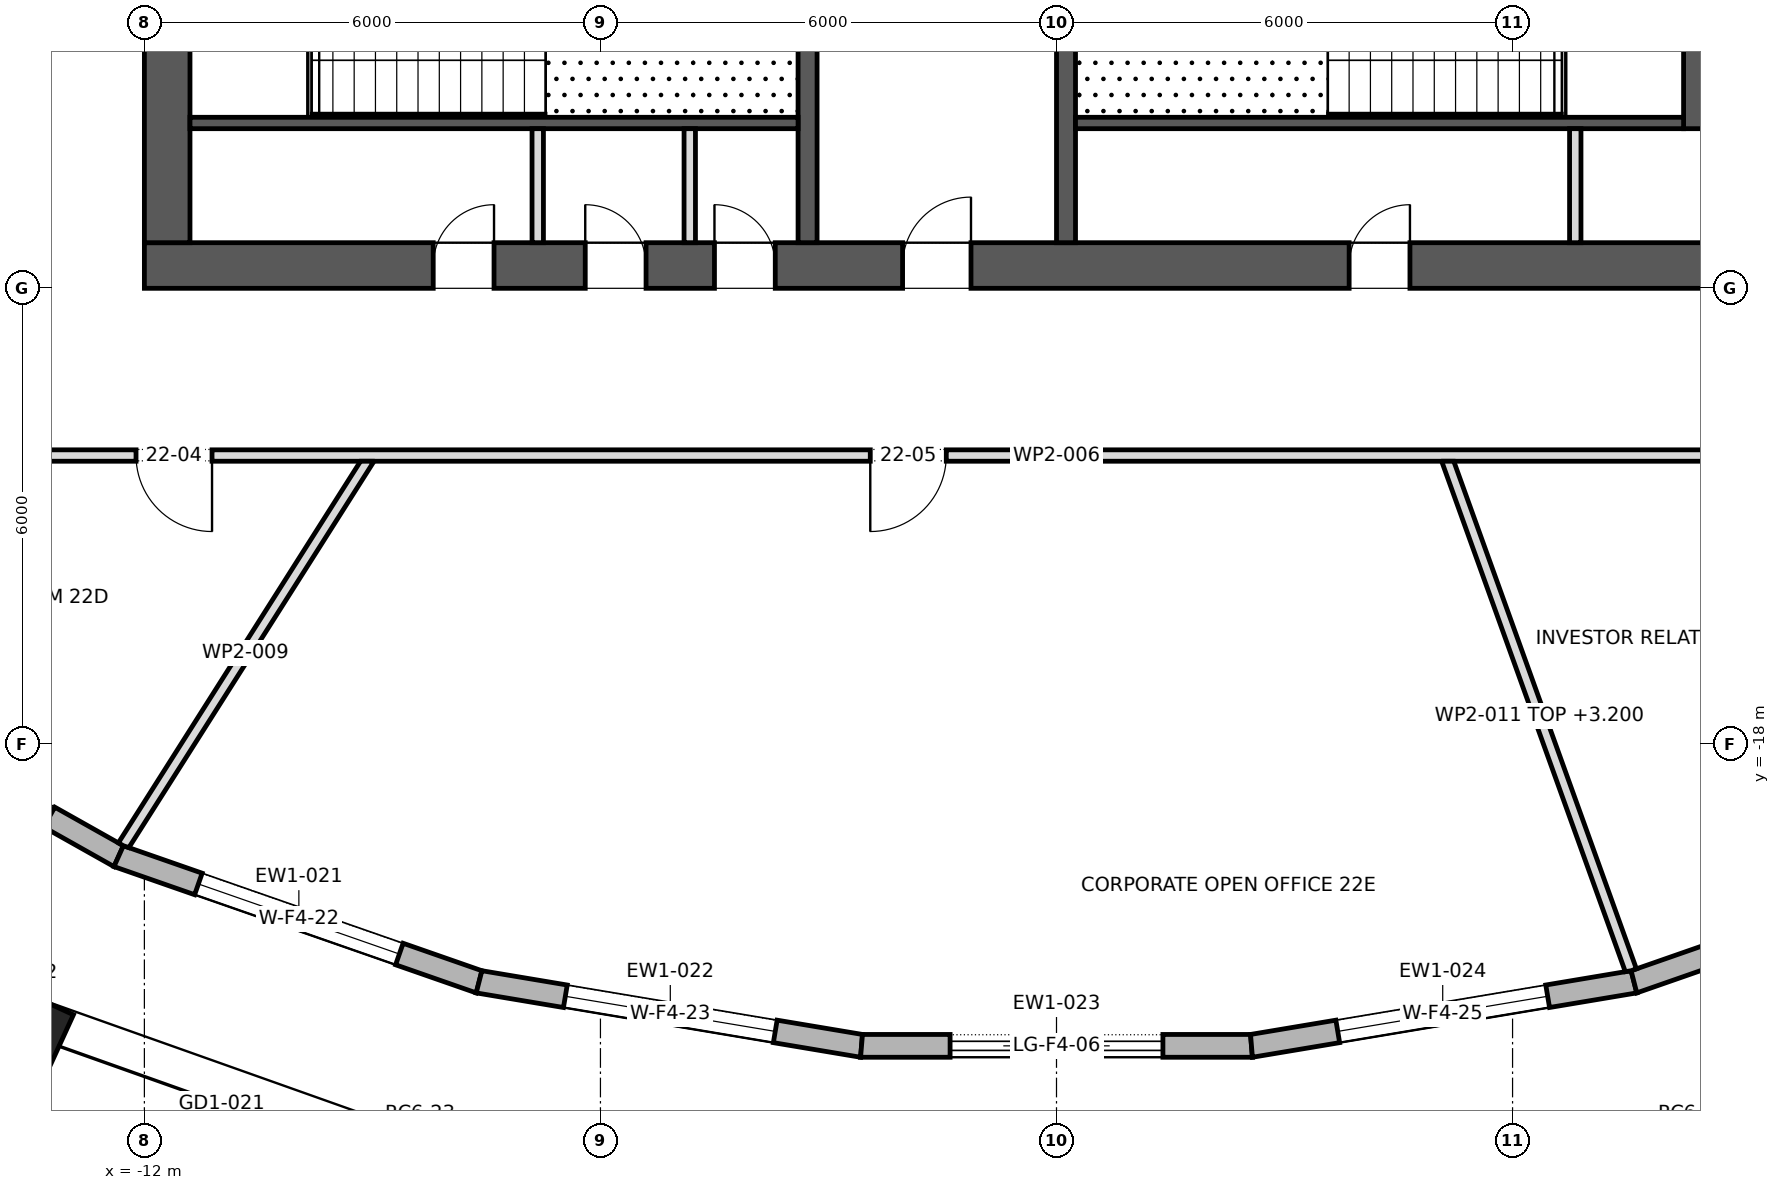
"""IFC4 building model, lengths in metres.
Left out: names, types, materials, properties, quantities, classifications, styles, units other than length and angle.
Written with IfcOpenShell. Run it as: python <this file> out.ifc"""

import sys

from ifc_helpers import new_model, si_unit, direction, frame, frame_2d, origin, origin_2d, place, context, subcontext, project, spatial, polyline, rectangle, outline, extrude, element, fill, save


model = new_model("IFC4")
c1 = context("Model", 3, precision=1e-05, world=origin(), true_north=direction((0.0, 1.0)))
c2 = subcontext(c1, "Body", "Model", "MODEL_VIEW")
j1 = project(units=[si_unit("LENGTHUNIT", "METRE"), si_unit("PLANEANGLEUNIT", "RADIAN")], contexts=[c1])
p1 = place(None, origin())
s1 = spatial("IfcSite", under=j1, at=p1, CompositionType="ELEMENT")
p2 = place(p1, origin())
s2 = spatial("IfcBuilding", under=s1, at=p2, CompositionType="ELEMENT")
p3 = place(p2, frame((0.0, 0.0, 304.3)))
s3 = spatial("IfcBuildingStorey", under=s2, at=p3, CompositionType="ELEMENT", Elevation=304.3)
p4 = place(p3, frame((-13.596, -21.803, 0.0), z_axis=(0.0, 0.0, 1.0), x_axis=(0.909126368869, -0.416520402174, 0.0)))
e1 = element("IfcColumn", 1, at=p4, inside=s3, PredefinedType="COLUMN", context=c2, shape_type="SweptSolid", body=[
    extrude(rectangle(XDim=1.0, YDim=1.0, at=origin_2d()), origin(), (0.0, 0.0, 1.0), 4.0),
])
p5 = place(p3, frame((-12.0, -11.7, 0.0), z_axis=(0.0, 0.0, 1.0), x_axis=(1.0, 0.0, 0.0)))
e2 = element("IfcWall", 2, at=p5, inside=s3, PredefinedType="SHEAR", context=c2, shape_type="SweptSolid", body=[
    extrude(rectangle(XDim=24.0, YDim=0.6, at=frame_2d((12.0, 0.0))), origin(), (0.0, 0.0, 1.0), 4.0),
])
p6 = place(p5, frame((9.975, 0.0, 0.0)))
e3 = element("IfcOpeningElement", 3, at=p6, cuts=e2, PredefinedType="OPENING", context=c2, shape_type="SweptSolid", body=[
    extrude(rectangle(XDim=0.9, YDim=2.1, at=frame_2d((0.45, 1.05))), frame((0.0, 0.312, 0.0), z_axis=(0.0, -1.0, 0.0), x_axis=(1.0, 0.0, 0.0)), (0.0, 0.0, 1.0), 0.624),
])
p7 = place(p5, frame((3.8, 0.0, 0.0)))
e4 = element("IfcOpeningElement", 4, at=p7, cuts=e2, PredefinedType="OPENING", context=c2, shape_type="SweptSolid", body=[
    extrude(rectangle(XDim=0.8, YDim=2.1, at=frame_2d((0.4, 1.05))), frame((0.0, 0.312, 0.0), z_axis=(0.0, -1.0, 0.0), x_axis=(1.0, 0.0, 0.0)), (0.0, 0.0, 1.0), 0.624),
])
p8 = place(p5, frame((5.8, 0.0, 0.0)))
e5 = element("IfcOpeningElement", 5, at=p8, cuts=e2, PredefinedType="OPENING", context=c2, shape_type="SweptSolid", body=[
    extrude(rectangle(XDim=0.8, YDim=2.1, at=frame_2d((0.4, 1.05))), frame((0.0, 0.312, 0.0), z_axis=(0.0, -1.0, 0.0), x_axis=(1.0, 0.0, 0.0)), (0.0, 0.0, 1.0), 0.624),
])
p9 = place(p5, frame((7.5, 0.0, 0.0)))
e6 = element("IfcOpeningElement", 6, at=p9, cuts=e2, PredefinedType="OPENING", context=c2, shape_type="SweptSolid", body=[
    extrude(rectangle(XDim=0.8, YDim=2.1, at=frame_2d((0.4, 1.05))), frame((0.0, 0.312, 0.0), z_axis=(0.0, -1.0, 0.0), x_axis=(1.0, 0.0, 0.0)), (0.0, 0.0, 1.0), 0.624),
])
p10 = place(p5, frame((15.85, 0.0, 0.0)))
e7 = element("IfcOpeningElement", 7, at=p10, cuts=e2, PredefinedType="OPENING", context=c2, shape_type="SweptSolid", body=[
    extrude(rectangle(XDim=0.8, YDim=2.1, at=frame_2d((0.4, 1.05))), frame((0.0, 0.312, 0.0), z_axis=(0.0, -1.0, 0.0), x_axis=(1.0, 0.0, 0.0)), (0.0, 0.0, 1.0), 0.624),
])
p11 = place(p3, frame((-11.7, -11.4, 0.0), z_axis=(0.0, 0.0, 1.0), x_axis=(0.0, 1.0, 0.0)))
e8 = element("IfcWall", 8, at=p11, inside=s3, PredefinedType="SHEAR", context=c2, shape_type="SweptSolid", body=[
    extrude(rectangle(XDim=22.8, YDim=0.6, at=frame_2d((11.4, 0.0))), origin(), (0.0, 0.0, 1.0), 4.0),
])
p12 = place(p11, frame((10.2, 0.0, 0.0)))
e9 = element("IfcOpeningElement", 9, at=p12, cuts=e8, PredefinedType="OPENING", context=c2, shape_type="SweptSolid", body=[
    extrude(rectangle(XDim=2.4, YDim=2.1, at=frame_2d((1.2, 1.05))), frame((0.0, 0.312, 0.0), z_axis=(0.0, -1.0, 0.0), x_axis=(1.0, 0.0, 0.0)), (0.0, 0.0, 1.0), 0.624),
])
p13 = place(p11, frame((18.925, 0.0, 0.0)))
e10 = element("IfcOpeningElement", 10, at=p13, cuts=e8, PredefinedType="OPENING", context=c2, shape_type="SweptSolid", body=[
    extrude(rectangle(XDim=1.2, YDim=2.1, at=frame_2d((0.6, 1.05))), frame((0.0, 0.312, 0.0), z_axis=(0.0, -1.0, 0.0), x_axis=(1.0, 0.0, 0.0)), (0.0, 0.0, 1.0), 0.624),
])
p14 = place(p11, frame((2.675, 0.0, 0.0)))
e11 = element("IfcOpeningElement", 11, at=p14, cuts=e8, PredefinedType="OPENING", context=c2, shape_type="SweptSolid", body=[
    extrude(rectangle(XDim=1.2, YDim=2.1, at=frame_2d((0.6, 1.05))), frame((0.0, 0.312, 0.0), z_axis=(0.0, -1.0, 0.0), x_axis=(1.0, 0.0, 0.0)), (0.0, 0.0, 1.0), 0.624),
])
p15 = place(p3, frame((-16.607, -17.07, 0.0), z_axis=(0.0, 0.0, 1.0), x_axis=(0.871570211895, -0.490270706588, 0.0)))
e12 = element("IfcWall", 12, at=p15, inside=s3, PredefinedType="STANDARD", context=c2, shape_type="SweptSolid", body=[
    extrude(outline(polyline([(-0.014, -0.15), (4.911, -0.15), (4.884, 0.15), (0.014, 0.15), (-0.014, -0.15)])), origin(), (0.0, 0.0, 1.0), 3.7),
])
p16 = place(p15, frame((1.049, 0.0, 0.6)))
e13 = element("IfcOpeningElement", 13, at=p16, cuts=e12, PredefinedType="OPENING", context=c2, shape_type="SweptSolid", body=[
    extrude(rectangle(XDim=2.8, YDim=2.65, at=frame_2d((1.4, 1.325))), frame((0.0, 0.162, 0.0), z_axis=(0.0, -1.0, 0.0), x_axis=(1.0, 0.0, 0.0)), (0.0, 0.0, 1.0), 0.324),
])
p17 = place(p3, frame((-12.338, -19.471, 0.0), z_axis=(0.0, 0.0, 1.0), x_axis=(0.944251863618, -0.329223963365, 0.0)))
e14 = element("IfcWall", 14, at=p17, inside=s3, PredefinedType="STANDARD", context=c2, shape_type="SweptSolid", body=[
    extrude(outline(polyline([(-0.013, -0.15), (5.034, -0.15), (5.009, 0.15), (0.013, 0.15), (-0.013, -0.15)])), origin(), (0.0, 0.0, 1.0), 3.7),
])
p18 = place(p17, frame((1.111, 0.0, 0.6)))
e15 = element("IfcOpeningElement", 15, at=p18, cuts=e14, PredefinedType="OPENING", context=c2, shape_type="SweptSolid", body=[
    extrude(rectangle(XDim=2.8, YDim=2.65, at=frame_2d((1.4, 1.325))), frame((0.0, 0.162, 0.0), z_axis=(0.0, -1.0, 0.0), x_axis=(1.0, 0.0, 0.0)), (0.0, 0.0, 1.0), 0.324),
])
p19 = place(p3, frame((-7.597, -21.124, 0.0), z_axis=(0.0, 0.0, 1.0), x_axis=(0.986269480969, -0.165143909695, 0.0)))
e16 = element("IfcWall", 16, at=p19, inside=s3, PredefinedType="STANDARD", context=c2, shape_type="SweptSolid", body=[
    extrude(outline(polyline([(-0.013, -0.15), (5.114, -0.15), (5.089, 0.15), (0.013, 0.15), (-0.013, -0.15)])), origin(), (0.0, 0.0, 1.0), 3.7),
])
p20 = place(p19, frame((1.151, 0.0, 0.6)))
e17 = element("IfcOpeningElement", 17, at=p20, cuts=e16, PredefinedType="OPENING", context=c2, shape_type="SweptSolid", body=[
    extrude(rectangle(XDim=2.8, YDim=2.65, at=frame_2d((1.4, 1.325))), frame((0.0, 0.162, 0.0), z_axis=(0.0, -1.0, 0.0), x_axis=(1.0, 0.0, 0.0)), (0.0, 0.0, 1.0), 0.324),
])
p21 = place(p3, frame((-2.565, -21.966, 0.0), z_axis=(0.0, 0.0, 1.0), x_axis=(1.0, 0.0, 0.0)))
e18 = element("IfcWall", 18, at=p21, inside=s3, PredefinedType="STANDARD", context=c2, shape_type="SweptSolid", body=[
    extrude(outline(polyline([(-0.012, -0.15), (5.143, -0.15), (5.118, 0.15), (0.012, 0.15), (-0.012, -0.15)])), origin(), (0.0, 0.0, 1.0), 3.7),
])
p22 = place(p21, frame((1.165, 0.0, 0.0)))
e19 = element("IfcOpeningElement", 19, at=p22, cuts=e18, PredefinedType="OPENING", context=c2, shape_type="SweptSolid", body=[
    extrude(rectangle(XDim=2.8, YDim=3.25, at=frame_2d((1.4, 1.625))), frame((0.0, 0.162, 0.0), z_axis=(0.0, -1.0, 0.0), x_axis=(1.0, 0.0, 0.0)), (0.0, 0.0, 1.0), 0.324),
])
p23 = place(p3, frame((2.565, -21.966, 0.0), z_axis=(0.0, 0.0, 1.0), x_axis=(0.986269480969, 0.165143909695, 0.0)))
e20 = element("IfcWall", 20, at=p23, inside=s3, PredefinedType="STANDARD", context=c2, shape_type="SweptSolid", body=[
    extrude(outline(polyline([(-0.012, -0.15), (5.115, -0.15), (5.089, 0.15), (0.012, 0.15), (-0.012, -0.15)])), origin(), (0.0, 0.0, 1.0), 3.7),
])
p24 = place(p23, frame((1.151, 0.0, 0.6)))
e21 = element("IfcOpeningElement", 21, at=p24, cuts=e20, PredefinedType="OPENING", context=c2, shape_type="SweptSolid", body=[
    extrude(rectangle(XDim=2.8, YDim=2.65, at=frame_2d((1.4, 1.325))), frame((0.0, 0.162, 0.0), z_axis=(0.0, -1.0, 0.0), x_axis=(1.0, 0.0, 0.0)), (0.0, 0.0, 1.0), 0.324),
])
p25 = place(p3, frame((7.597, -21.124, 0.0), z_axis=(0.0, 0.0, 1.0), x_axis=(0.944251863618, 0.329223963365, 0.0)))
e22 = element("IfcWall", 22, at=p25, inside=s3, PredefinedType="STANDARD", context=c2, shape_type="SweptSolid", body=[
    extrude(outline(polyline([(-0.013, -0.15), (5.034, -0.15), (5.008, 0.15), (0.013, 0.15), (-0.013, -0.15)])), origin(), (0.0, 0.0, 1.0), 3.7),
])
p26 = place(p25, frame((1.111, 0.0, 0.6)))
e23 = element("IfcOpeningElement", 23, at=p26, cuts=e22, PredefinedType="OPENING", context=c2, shape_type="SweptSolid", body=[
    extrude(rectangle(XDim=2.8, YDim=2.65, at=frame_2d((1.4, 1.325))), frame((0.0, 0.162, 0.0), z_axis=(0.0, -1.0, 0.0), x_axis=(1.0, 0.0, 0.0)), (0.0, 0.0, 1.0), 0.324),
])
for number, where, z_axis, x_axis in (
    (24, (-3.275, -11.4, 0.0), (0.0, 0.0, 1.0), (0.0, 1.0, 0.0)),
    (25, (0.125, -11.4, 0.0), (0.0, 0.0, 1.0), (0.0, 1.0, 0.0)),
):
    element("IfcWall", number, at=place(p3, frame(where, z_axis=z_axis, x_axis=x_axis)), inside=s3, PredefinedType="SHEAR", context=c2, shape_type="SweptSolid", body=[
        extrude(rectangle(XDim=4.9, YDim=0.25, at=frame_2d((2.45, 0.0))), origin(), (0.0, 0.0, 1.0), 3.7),
    ])
p27 = place(p3, frame((8.375, -9.9, 0.0), z_axis=(0.0, 0.0, 1.0), x_axis=(0.0, 1.0, 0.0)))
e26 = element("IfcWall", 26, at=p27, inside=s3, PredefinedType="SHEAR", context=c2, shape_type="SweptSolid", body=[
    extrude(rectangle(XDim=3.4, YDim=0.25, at=frame_2d((1.7, 0.0))), origin(), (0.0, 0.0, 1.0), 3.7),
])
p28 = place(p27, frame((1.175, 0.0, 0.0)))
e27 = element("IfcOpeningElement", 27, at=p28, cuts=e26, PredefinedType="OPENING", context=c2, shape_type="SweptSolid", body=[
    extrude(rectangle(XDim=1.2, YDim=2.1, at=frame_2d((0.6, 1.05))), frame((0.0, 0.137, 0.0), z_axis=(0.0, -1.0, 0.0), x_axis=(1.0, 0.0, 0.0)), (0.0, 0.0, 1.0), 0.274),
])
for number, where, z_axis, x_axis in (
    (28, (-11.4, -9.825, 0.0), (0.0, 0.0, 1.0), (1.0, 0.0, 0.0)),
    (29, (0.25, -9.825, 0.0), (0.0, 0.0, 1.0), (1.0, 0.0, 0.0)),
):
    element("IfcWall", number, at=place(p3, frame(where, z_axis=z_axis, x_axis=x_axis)), inside=s3, PredefinedType="SHEAR", context=c2, shape_type="SweptSolid", body=[
        extrude(rectangle(XDim=8.0, YDim=0.15, at=frame_2d((4.0, 0.0))), origin(), (0.0, 0.0, 1.0), 3.7),
    ])
for number, where, z_axis, x_axis in (
    (30, (-6.825, -11.4, 0.0), (0.0, 0.0, 1.0), (0.0, 1.0, 0.0)),
    (31, (-4.825, -11.4, 0.0), (0.0, 0.0, 1.0), (0.0, 1.0, 0.0)),
    (32, (6.825, -11.4, 0.0), (0.0, 0.0, 1.0), (0.0, 1.0, 0.0)),
):
    element("IfcWall", number, at=place(p3, frame(where, z_axis=z_axis, x_axis=x_axis)), inside=s3, PredefinedType="PARTITIONING", context=c2, shape_type="SweptSolid", body=[
        extrude(rectangle(XDim=1.5, YDim=0.15, at=frame_2d((0.75, 0.0))), origin(), (0.0, 0.0, 1.0), 3.7),
    ])
p29 = place(p3, frame((-14.275, -14.2, 0.0), z_axis=(0.0, 0.0, 1.0), x_axis=(1.0, 0.0, 0.0)))
e33 = element("IfcWall", 33, at=p29, inside=s3, PredefinedType="PARTITIONING", context=c2, shape_type="SweptSolid", body=[
    extrude(outline(polyline([(28.55, -0.075), (28.55, -0.075), (28.4, 0.075), (26.517, 0.075), (24.633, 0.075), (22.75, 0.075), (20.866, 0.075), (18.983, 0.075), (17.1, 0.075), (15.217, 0.075), (13.333, 0.075), (11.45, 0.075), (9.567, 0.075), (7.683, 0.075), (5.8, 0.075), (3.917, 0.075), (2.033, 0.075), (0.15, 0.075), (0.0, -0.075), (1.903, -0.075), (3.807, -0.075), (5.71, -0.075), (7.613, -0.075), (9.517, -0.075), (11.42, -0.075), (13.323, -0.075), (15.227, -0.075), (17.13, -0.075), (19.033, -0.075), (20.937, -0.075), (22.84, -0.075), (24.743, -0.075), (26.646, -0.075), (28.55, -0.075)])), origin(), (0.0, 0.0, 1.0), 3.7),
])
p30 = place(p29, frame((2.165, 0.0, 0.0)))
e34 = element("IfcOpeningElement", 34, at=p30, cuts=e33, PredefinedType="OPENING", context=c2, shape_type="SweptSolid", body=[
    extrude(rectangle(XDim=1.0, YDim=2.1, at=frame_2d((0.5, 1.05))), frame((0.0, 0.087, 0.0), z_axis=(0.0, -1.0, 0.0), x_axis=(1.0, 0.0, 0.0)), (0.0, 0.0, 1.0), 0.174),
])
p31 = place(p29, frame((11.825, 0.0, 0.0)))
e35 = element("IfcOpeningElement", 35, at=p31, cuts=e33, PredefinedType="OPENING", context=c2, shape_type="SweptSolid", body=[
    extrude(rectangle(XDim=1.0, YDim=2.1, at=frame_2d((0.5, 1.05))), frame((0.0, 0.087, 0.0), z_axis=(0.0, -1.0, 0.0), x_axis=(1.0, 0.0, 0.0)), (0.0, 0.0, 1.0), 0.174),
])
p32 = place(p29, frame((23.255, 0.0, 0.0)))
e36 = element("IfcOpeningElement", 36, at=p32, cuts=e33, PredefinedType="OPENING", context=c2, shape_type="SweptSolid", body=[
    extrude(rectangle(XDim=1.0, YDim=2.1, at=frame_2d((0.5, 1.05))), frame((0.0, 0.087, 0.0), z_axis=(0.0, -1.0, 0.0), x_axis=(1.0, 0.0, 0.0)), (0.0, 0.0, 1.0), 0.174),
])
p33 = place(p3, frame((-9.042, -14.235, 0.0), z_axis=(0.0, 0.0, 1.0), x_axis=(-0.535766262989, -0.844366337228, 0.0)))
e37 = element("IfcWall", 37, at=p33, inside=s3, PredefinedType="PARTITIONING", context=c2, shape_type="SweptSolid", body=[
    extrude(outline(polyline([(6.041, -0.075), (6.041, -0.067), (6.037, 0.001), (6.02, 0.075), (4.515, 0.075), (3.01, 0.075), (1.505, 0.075), (0.0, 0.075), (0.0, 0.074), (0.095, -0.075), (2.077, -0.075), (4.059, -0.075), (6.041, -0.075)])), origin(), (0.0, 0.0, 1.0), 3.7),
])
p34 = place(p3, frame((5.138, -14.25, 0.0), z_axis=(0.0, 0.0, 1.0), x_axis=(0.338519975389, -0.940959205419, 0.0)))
e38 = element("IfcWall", 38, at=p34, inside=s3, PredefinedType="PARTITIONING", context=c2, shape_type="SweptSolid", body=[
    extrude(outline(polyline([(0.0, -0.075), (1.784, -0.075), (3.568, -0.075), (5.353, -0.075), (7.137, -0.075), (7.15, 0.001), (7.151, 0.019), (7.151, 0.075), (5.376, 0.075), (3.602, 0.075), (1.828, 0.075), (0.053, 0.075), (0.0, -0.074), (0.0, -0.075)])), origin(), (0.0, 0.0, 1.0), 3.2),
])
p35 = place(p18, origin())
e39 = element("IfcWindow", 39, at=p35, inside=s3, PartitioningType="DOUBLE_PANEL_VERTICAL", PredefinedType="WINDOW", context=c2, shape_type="SweptSolid", body=[
    extrude(rectangle(XDim=2.8, YDim=2.65, at=frame_2d((1.4, 1.325))), frame((0.0, 0.03, 0.0), z_axis=(0.0, -1.0, 0.0), x_axis=(1.0, 0.0, 0.0)), (0.0, 0.0, 1.0), 0.06),
])
fill(e15, e39)
p36 = place(p20, origin())
e40 = element("IfcWindow", 40, at=p36, inside=s3, PartitioningType="DOUBLE_PANEL_VERTICAL", PredefinedType="WINDOW", context=c2, shape_type="SweptSolid", body=[
    extrude(rectangle(XDim=2.8, YDim=2.65, at=frame_2d((1.4, 1.325))), frame((0.0, 0.03, 0.0), z_axis=(0.0, -1.0, 0.0), x_axis=(1.0, 0.0, 0.0)), (0.0, 0.0, 1.0), 0.06),
])
fill(e17, e40)
p37 = place(p22, origin())
e41 = element("IfcDoor", 41, at=p37, inside=s3, OperationType="DOUBLE_DOOR_SLIDING", PredefinedType="DOOR", context=c2, shape_type="SweptSolid", body=[
    extrude(rectangle(XDim=2.8, YDim=3.25, at=frame_2d((1.4, 1.625))), frame((0.0, 0.025, 0.0), z_axis=(0.0, -1.0, 0.0), x_axis=(1.0, 0.0, 0.0)), (0.0, 0.0, 1.0), 0.05),
])
fill(e19, e41)
p38 = place(p24, origin())
e42 = element("IfcWindow", 42, at=p38, inside=s3, PartitioningType="DOUBLE_PANEL_VERTICAL", PredefinedType="WINDOW", context=c2, shape_type="SweptSolid", body=[
    extrude(rectangle(XDim=2.8, YDim=2.65, at=frame_2d((1.4, 1.325))), frame((0.0, 0.03, 0.0), z_axis=(0.0, -1.0, 0.0), x_axis=(1.0, 0.0, 0.0)), (0.0, 0.0, 1.0), 0.06),
])
fill(e21, e42)
p39 = place(p6, origin())
e43 = element("IfcDoor", 43, at=p39, inside=s3, OperationType="SINGLE_SWING_LEFT", PredefinedType="DOOR", context=c2, shape_type="SweptSolid", body=[
    extrude(rectangle(XDim=0.9, YDim=2.1, at=frame_2d((0.45, 1.05))), frame((0.0, 0.025, 0.0), z_axis=(0.0, -1.0, 0.0), x_axis=(1.0, 0.0, 0.0)), (0.0, 0.0, 1.0), 0.05),
])
fill(e3, e43)
p40 = place(p7, origin())
e44 = element("IfcDoor", 44, at=p40, inside=s3, OperationType="SINGLE_SWING_LEFT", PredefinedType="DOOR", context=c2, shape_type="SweptSolid", body=[
    extrude(rectangle(XDim=0.8, YDim=2.1, at=frame_2d((0.4, 1.05))), frame((0.0, 0.025, 0.0), z_axis=(0.0, -1.0, 0.0), x_axis=(1.0, 0.0, 0.0)), (0.0, 0.0, 1.0), 0.05),
])
fill(e4, e44)
p41 = place(p8, origin())
e45 = element("IfcDoor", 45, at=p41, inside=s3, OperationType="SINGLE_SWING_RIGHT", PredefinedType="DOOR", context=c2, shape_type="SweptSolid", body=[
    extrude(rectangle(XDim=0.8, YDim=2.1, at=frame_2d((0.4, 1.05))), frame((0.0, 0.025, 0.0), z_axis=(0.0, -1.0, 0.0), x_axis=(1.0, 0.0, 0.0)), (0.0, 0.0, 1.0), 0.05),
])
fill(e5, e45)
p42 = place(p9, origin())
e46 = element("IfcDoor", 46, at=p42, inside=s3, OperationType="SINGLE_SWING_RIGHT", PredefinedType="DOOR", context=c2, shape_type="SweptSolid", body=[
    extrude(rectangle(XDim=0.8, YDim=2.1, at=frame_2d((0.4, 1.05))), frame((0.0, 0.025, 0.0), z_axis=(0.0, -1.0, 0.0), x_axis=(1.0, 0.0, 0.0)), (0.0, 0.0, 1.0), 0.05),
])
fill(e6, e46)
p43 = place(p10, origin())
e47 = element("IfcDoor", 47, at=p43, inside=s3, OperationType="SINGLE_SWING_LEFT", PredefinedType="DOOR", context=c2, shape_type="SweptSolid", body=[
    extrude(rectangle(XDim=0.8, YDim=2.1, at=frame_2d((0.4, 1.05))), frame((0.0, 0.025, 0.0), z_axis=(0.0, -1.0, 0.0), x_axis=(1.0, 0.0, 0.0)), (0.0, 0.0, 1.0), 0.05),
])
fill(e7, e47)
p44 = place(p30, frame((1.0, 0.0, 0.0), z_axis=(0.0, 0.0, 1.0), x_axis=(-1.0, 0.0, 0.0)))
e48 = element("IfcDoor", 48, at=p44, inside=s3, OperationType="SINGLE_SWING_RIGHT", PredefinedType="DOOR", context=c2, shape_type="SweptSolid", body=[
    extrude(rectangle(XDim=1.0, YDim=2.1, at=frame_2d((0.5, 1.05))), frame((0.0, 0.025, 0.0), z_axis=(0.0, -1.0, 0.0), x_axis=(1.0, 0.0, 0.0)), (0.0, 0.0, 1.0), 0.05),
])
fill(e34, e48)
p45 = place(p31, frame((1.0, 0.0, 0.0), z_axis=(0.0, 0.0, 1.0), x_axis=(-1.0, 0.0, 0.0)))
e49 = element("IfcDoor", 49, at=p45, inside=s3, OperationType="SINGLE_SWING_LEFT", PredefinedType="DOOR", context=c2, shape_type="SweptSolid", body=[
    extrude(rectangle(XDim=1.0, YDim=2.1, at=frame_2d((0.5, 1.05))), frame((0.0, 0.025, 0.0), z_axis=(0.0, -1.0, 0.0), x_axis=(1.0, 0.0, 0.0)), (0.0, 0.0, 1.0), 0.05),
])
fill(e35, e49)
save(model, sys.argv[1])
